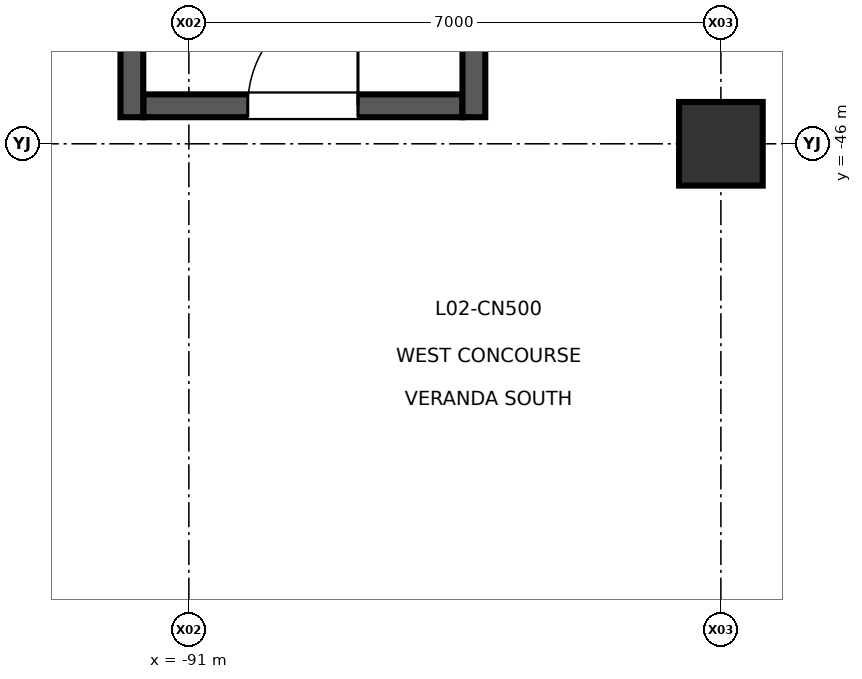
"""IFC4 building model, lengths in metres.
Left out: names, types, materials, properties, quantities, classifications, styles, units other than length and angle.
Written with IfcOpenShell. Run it as: python <this file> out.ifc"""

import sys

from ifc_helpers import new_model, si_unit, direction, frame, frame_2d, origin, origin_2d, place, context, subcontext, project, spatial, rectangle, extrude, element, fill, save


model = new_model("IFC4")
c1 = context("Model", 3, precision=1e-05, world=origin(), true_north=direction((0.0, 1.0)))
c2 = subcontext(c1, "Body", "Model", "MODEL_VIEW")
j1 = project(units=[si_unit("LENGTHUNIT", "METRE"), si_unit("PLANEANGLEUNIT", "RADIAN")], contexts=[c1])
p1 = place(None, origin())
s1 = spatial("IfcSite", under=j1, at=p1, CompositionType="ELEMENT")
p2 = place(p1, origin())
s2 = spatial("IfcBuilding", under=s1, at=p2, CompositionType="ELEMENT")
p3 = place(p2, frame((0.0, 0.0, 6.0)))
s3 = spatial("IfcBuildingStorey", under=s2, at=p3, CompositionType="ELEMENT", Elevation=6.0)
p4 = place(p3, frame((-84.0, -46.0, 0.0), z_axis=(0.0, 0.0, 1.0), x_axis=(1.0, 0.0, 0.0)))
e1 = element("IfcColumn", 1, at=p4, inside=s3, PredefinedType="COLUMN", context=c2, shape_type="SweptSolid", body=[
    extrude(rectangle(XDim=1.1, YDim=1.1, at=origin_2d()), origin(), (0.0, 0.0, 1.0), 5.398),
])
p5 = place(p3, frame((-91.6, -45.5, 0.0), z_axis=(0.0, 0.0, 1.0), x_axis=(1.0, 0.0, 0.0)))
e2 = element("IfcWall", 2, at=p5, inside=s3, PredefinedType="SHEAR", context=c2, shape_type="SweptSolid", body=[
    extrude(rectangle(XDim=4.2, YDim=0.3, at=frame_2d((2.1, 0.0))), origin(), (0.0, 0.0, 1.0), 5.2),
])
p6 = place(p5, frame((1.375, 0.0, 0.0)))
e3 = element("IfcOpeningElement", 3, at=p6, cuts=e2, PredefinedType="OPENING", context=c2, shape_type="SweptSolid", body=[
    extrude(rectangle(XDim=1.45, YDim=2.2, at=frame_2d((0.725, 1.1))), frame((0.0, 0.16, 0.0), z_axis=(0.0, -1.0, 0.0), x_axis=(1.0, 0.0, 0.0)), (0.0, 0.0, 1.0), 0.32),
])
for number, where, z_axis, x_axis in (
    (4, (-91.75, -45.65, 0.0), (0.0, 0.0, 1.0), (0.0, 1.0, 0.0)),
    (5, (-87.25, -45.65, 0.0), (0.0, 0.0, 1.0), (0.0, 1.0, 0.0)),
):
    element("IfcWall", number, at=place(p3, frame(where, z_axis=z_axis, x_axis=x_axis)), inside=s3, PredefinedType="SHEAR", context=c2, shape_type="SweptSolid", body=[
        extrude(rectangle(XDim=8.45, YDim=0.3, at=frame_2d((4.225, 0.0))), origin(), (0.0, 0.0, 1.0), 5.2),
    ])
p7 = place(p6, origin())
e6 = element("IfcDoor", 6, at=p7, inside=s3, OperationType="SINGLE_SWING_RIGHT", PredefinedType="DOOR", context=c2, shape_type="SweptSolid", body=[
    extrude(rectangle(XDim=1.45, YDim=2.2, at=frame_2d((0.725, 1.1))), frame((0.0, 0.025, 0.0), z_axis=(0.0, -1.0, 0.0), x_axis=(1.0, 0.0, 0.0)), (0.0, 0.0, 1.0), 0.05),
])
fill(e3, e6)
save(model, sys.argv[1])
